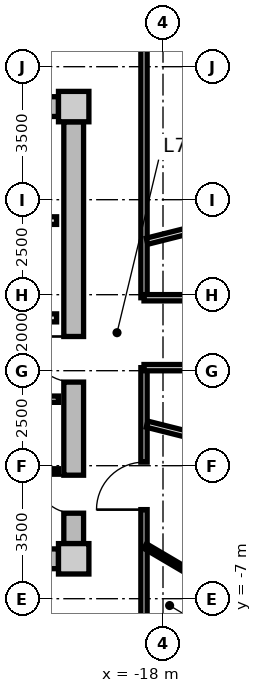
"""IFC4 building model, lengths in metres.
Left out: names, types, materials, properties, quantities, classifications, styles, units other than length and angle.
Written with IfcOpenShell. Run it as: python <this file> out.ifc"""

import sys

from ifc_helpers import new_model, si_unit, direction, frame, frame_2d, origin, origin_2d, place, context, subcontext, project, spatial, rectangle, extrude, source, transform, mapped, element, fill, save


model = new_model("IFC4")
c1 = context("Model", 3, precision=1e-05, world=origin(), true_north=direction((0.0, 1.0)))
c2 = subcontext(c1, "Body", "Model", "MODEL_VIEW")
j1 = project(units=[si_unit("LENGTHUNIT", "METRE"), si_unit("PLANEANGLEUNIT", "RADIAN")], contexts=[c1])
p1 = place(None, origin())
s1 = spatial("IfcSite", under=j1, at=p1, CompositionType="ELEMENT")
p2 = place(p1, origin())
s2 = spatial("IfcBuilding", under=s1, at=p2, CompositionType="ELEMENT")
p3 = place(p2, frame((0.0, 0.0, 229.15)))
s3 = spatial("IfcBuildingStorey", under=s2, at=p3, CompositionType="ELEMENT", Elevation=229.15)
m1 = source(origin(), c2, "Body", "SweptSolid", [
    extrude(rectangle(XDim=0.8, YDim=0.8, at=origin_2d()), origin(), (0.0, 0.0, 1.0), 3.05),
])
for number, where, z_axis, x_axis in (
    (1, (-20.35, -5.95, 0.0), (0.0, 0.0, 1.0), (1.0, 0.0, 0.0)),
    (2, (-20.35, 5.95, 0.0), (0.0, 0.0, 1.0), (1.0, 0.0, 0.0)),
):
    element("IfcColumn", number, at=place(p3, frame(where, z_axis=z_axis, x_axis=x_axis)), inside=s3, PredefinedType="COLUMN", context=c2, shape_type="MappedRepresentation", body=[
        mapped(m1, transform((0.0, 0.0, 0.0), x_axis=(1.0, 0.0, 0.0), y_axis=(0.0, 1.0, 0.0), z_axis=(0.0, 0.0, 1.0), scale=1.0)),
    ])
m2 = source(origin(), c2, "Body", "SweptSolid", [
    extrude(rectangle(XDim=14.5, YDim=0.52, at=frame_2d((7.25, 0.0))), origin(), (0.0, 0.0, 1.0), 2.81),
])
for number, where, z_axis, x_axis in (
    (3, (-35.25, 5.95, 0.0), (0.0, 0.0, 1.0), (1.0, 0.0, 0.0)),
    (4, (-20.75, -5.95, 0.0), (0.0, 0.0, 1.0), (-1.0, 0.0, 0.0)),
):
    element("IfcWall", number, at=place(p3, frame(where, z_axis=z_axis, x_axis=x_axis)), inside=s3, PredefinedType="SHEAR", context=c2, shape_type="MappedRepresentation", body=[
        mapped(m2, transform((0.0, 0.0, 0.0), x_axis=(1.0, 0.0, 0.0), y_axis=(0.0, 1.0, 0.0), z_axis=(0.0, 0.0, 1.0), scale=1.0)),
    ])
m3 = source(origin(), c2, "Body", "SweptSolid", [
    extrude(rectangle(XDim=11.1, YDim=0.52, at=frame_2d((5.55, 0.0))), origin(), (0.0, 0.0, 1.0), 2.81),
])
p4 = place(p3, frame((-20.35, 5.55, 0.0), z_axis=(0.0, 0.0, 1.0), x_axis=(0.0, -1.0, 0.0)))
e5 = element("IfcWall", 5, at=p4, inside=s3, PredefinedType="SHEAR", context=c2, shape_type="MappedRepresentation", body=[
    mapped(m3, transform((0.0, 0.0, 0.0), x_axis=(1.0, 0.0, 0.0), y_axis=(0.0, 1.0, 0.0), z_axis=(0.0, 0.0, 1.0), scale=1.0)),
])
p5 = place(p4, frame((5.65, 0.0, 0.0)))
e6 = element("IfcOpeningElement", 6, at=p5, cuts=e5, PredefinedType="OPENING", context=c2, shape_type="SweptSolid", body=[
    extrude(rectangle(XDim=1.2, YDim=2.15, at=frame_2d((0.6, 1.075))), frame((0.0, 0.27, 0.0), z_axis=(0.0, -1.0, 0.0), x_axis=(1.0, 0.0, 0.0)), (0.0, 0.0, 1.0), 0.54),
])
p6 = place(p4, frame((9.3, 0.0, 0.0)))
e7 = element("IfcOpeningElement", 7, at=p6, cuts=e5, PredefinedType="OPENING", context=c2, shape_type="SweptSolid", body=[
    extrude(rectangle(XDim=1.0, YDim=2.1, at=frame_2d((0.5, 1.05))), frame((0.0, 0.27, 0.0), z_axis=(0.0, -1.0, 0.0), x_axis=(1.0, 0.0, 0.0)), (0.0, 0.0, 1.0), 0.54),
])
m4 = source(origin(), c2, "Body", "SweptSolid", [
    extrude(rectangle(XDim=3.2, YDim=0.2, at=frame_2d((1.6, 0.0))), origin(), (0.0, 0.0, 1.0), 2.795),
])
p7 = place(p3, frame((-24.0, 2.95, 0.0), z_axis=(0.0, 0.0, 1.0), x_axis=(1.0, 0.0, 0.0)))
e8 = element("IfcWall", 8, at=p7, inside=s3, PredefinedType="PARTITIONING", context=c2, shape_type="MappedRepresentation", body=[
    mapped(m4, transform((0.0, 0.0, 0.0), x_axis=(1.0, 0.0, 0.0), y_axis=(0.0, 1.0, 0.0), z_axis=(0.0, 0.0, 1.0), scale=1.0)),
])
m5 = source(origin(), c2, "Body", "SweptSolid", [
    extrude(rectangle(XDim=6.66, YDim=0.21, at=frame_2d((3.33, 0.0))), origin(), (0.0, 0.0, 1.0), 2.795),
])
p8 = place(p3, frame((-27.46, 0.39, 0.0), z_axis=(0.0, 0.0, 1.0), x_axis=(1.0, 0.0, 0.0)))
e9 = element("IfcWall", 9, at=p8, inside=s3, PredefinedType="PARTITIONING", context=c2, shape_type="MappedRepresentation", body=[
    mapped(m5, transform((0.0, 0.0, 0.0), x_axis=(1.0, 0.0, 0.0), y_axis=(0.0, 1.0, 0.0), z_axis=(0.0, 0.0, 1.0), scale=1.0)),
])
p9 = place(p8, frame((1.0, 0.0, 0.0)))
e10 = element("IfcOpeningElement", 10, at=p9, cuts=e9, PredefinedType="OPENING", context=c2, shape_type="SweptSolid", body=[
    extrude(rectangle(XDim=1.2, YDim=2.15, at=frame_2d((0.6, 1.075))), frame((0.0, 0.115, 0.0), z_axis=(0.0, -1.0, 0.0), x_axis=(1.0, 0.0, 0.0)), (0.0, 0.0, 1.0), 0.23),
])
m6 = source(origin(), c2, "Body", "SweptSolid", [
    extrude(rectangle(XDim=2.7, YDim=0.165, at=frame_2d((1.35, 0.0))), origin(), (0.0, 0.0, 1.0), 2.795),
])
p10 = place(p3, frame((-23.45, -1.75, 0.0), z_axis=(0.0, 0.0, 1.0), x_axis=(1.0, 0.0, 0.0)))
e11 = element("IfcWall", 11, at=p10, inside=s3, PredefinedType="PARTITIONING", context=c2, shape_type="MappedRepresentation", body=[
    mapped(m6, transform((0.0, 0.0, 0.0), x_axis=(1.0, 0.0, 0.0), y_axis=(0.0, 1.0, 0.0), z_axis=(0.0, 0.0, 1.0), scale=1.0)),
])
p11 = place(p10, frame((0.85, 0.0, 0.0)))
e12 = element("IfcOpeningElement", 12, at=p11, cuts=e11, PredefinedType="OPENING", context=c2, shape_type="SweptSolid", body=[
    extrude(rectangle(XDim=0.925, YDim=2.1, at=frame_2d((0.462, 1.05))), frame((0.0, 0.093, 0.0), z_axis=(0.0, -1.0, 0.0), x_axis=(1.0, 0.0, 0.0)), (0.0, 0.0, 1.0), 0.185),
])
m7 = source(origin(), c2, "Body", "SweptSolid", [
    extrude(rectangle(XDim=2.7, YDim=0.14, at=frame_2d((1.35, 0.0))), origin(), (0.0, 0.0, 1.0), 2.795),
])
p12 = place(p3, frame((-23.45, -3.65, 0.0), z_axis=(0.0, 0.0, 1.0), x_axis=(1.0, 0.0, 0.0)))
e13 = element("IfcWall", 13, at=p12, inside=s3, PredefinedType="PARTITIONING", context=c2, shape_type="MappedRepresentation", body=[
    mapped(m7, transform((0.0, 0.0, 0.0), x_axis=(1.0, 0.0, 0.0), y_axis=(0.0, 1.0, 0.0), z_axis=(0.0, 0.0, 1.0), scale=1.0)),
])
m8 = source(origin(), c2, "Body", "SweptSolid", [
    extrude(rectangle(XDim=6.88, YDim=0.165, at=frame_2d((3.44, 0.0))), origin(), (0.0, 0.0, 1.0), 2.795),
])
p13 = place(p3, frame((-18.5, 7.8, 0.0), z_axis=(0.0, 0.0, 1.0), x_axis=(0.0, -1.0, 0.0)))
e14 = element("IfcWall", 14, at=p13, inside=s3, PredefinedType="PARTITIONING", context=c2, shape_type="MappedRepresentation", body=[
    mapped(m8, transform((0.0, 0.0, 0.0), x_axis=(1.0, 0.0, 0.0), y_axis=(0.0, 1.0, 0.0), z_axis=(0.0, 0.0, 1.0), scale=1.0)),
])
p14 = place(p3, frame((-18.5, -0.92, 0.0), z_axis=(0.0, 0.0, 1.0), x_axis=(0.0, -1.0, 0.0)))
e15 = element("IfcWall", 15, at=p14, inside=s3, PredefinedType="PARTITIONING", context=c2, shape_type="MappedRepresentation", body=[
    mapped(m8, transform((0.0, 0.0, 0.0), x_axis=(1.0, 0.0, 0.0), y_axis=(0.0, 1.0, 0.0), z_axis=(0.0, 0.0, 1.0), scale=1.0)),
])
p15 = place(p14, frame((2.486, 0.0, 0.0)))
e16 = element("IfcOpeningElement", 16, at=p15, cuts=e15, PredefinedType="OPENING", context=c2, shape_type="SweptSolid", body=[
    extrude(rectangle(XDim=1.25, YDim=2.2, at=frame_2d((0.625, 1.1))), frame((0.0, 0.093, 0.0), z_axis=(0.0, -1.0, 0.0), x_axis=(1.0, 0.0, 0.0)), (0.0, 0.0, 1.0), 0.185),
])
m9 = source(origin(), c2, "Body", "SweptSolid", [
    extrude(rectangle(XDim=6.157, YDim=0.165, at=frame_2d((3.079, 0.0))), origin(), (0.0, 0.0, 1.0), 2.395),
])
for number, where, z_axis, x_axis in (
    (17, (-18.42, -2.407, 0.0), (0.0, 0.0, 1.0), (0.97, -0.244, 0.0)),
    (18, (-18.42, 2.407, 0.0), (0.0, 0.0, 1.0), (0.97, 0.244, 0.0)),
):
    element("IfcWall", number, at=place(p3, frame(where, z_axis=z_axis, x_axis=x_axis)), inside=s3, PredefinedType="PARTITIONING", context=c2, shape_type="MappedRepresentation", body=[
        mapped(m9, transform((0.0, 0.0, 0.0), x_axis=(1.0, 0.0, 0.0), y_axis=(0.0, 1.0, 0.0), z_axis=(0.0, 0.0, 1.0), scale=1.0)),
    ])
m10 = source(origin(), c2, "Body", "SweptSolid", [
    extrude(rectangle(XDim=1.859, YDim=0.14, at=frame_2d((0.93, 0.0))), origin(), (0.0, 0.0, 1.0), 2.795),
])
p16 = place(p3, frame((-18.47, -5.615, 0.0), z_axis=(0.0, 0.0, 1.0), x_axis=(0.861555897139, -0.507662718845, 0.0)))
e19 = element("IfcWall", 19, at=p16, inside=s3, PredefinedType="PARTITIONING", context=c2, shape_type="MappedRepresentation", body=[
    mapped(m10, transform((0.0, 0.0, 0.0), x_axis=(1.0, 0.0, 0.0), y_axis=(0.0, 1.0, 0.0), z_axis=(0.0, 0.0, 1.0), scale=1.0)),
])
m11 = source(origin(), c2, "Body", "SweptSolid", [
    extrude(rectangle(XDim=2.939, YDim=0.14, at=frame_2d((1.47, 0.0))), origin(), (0.0, 0.0, 1.0), 2.795),
])
p17 = place(p3, frame((-16.868, -6.559, 0.0), z_axis=(0.0, 0.0, 1.0), x_axis=(-0.505883614636, -0.862601743821, 0.0)))
e20 = element("IfcWall", 20, at=p17, inside=s3, PredefinedType="PARTITIONING", context=c2, shape_type="MappedRepresentation", body=[
    mapped(m11, transform((0.0, 0.0, 0.0), x_axis=(1.0, 0.0, 0.0), y_axis=(0.0, 1.0, 0.0), z_axis=(0.0, 0.0, 1.0), scale=1.0)),
])
p18 = place(p17, frame((1.01, 0.0, 0.0)))
e21 = element("IfcOpeningElement", 21, at=p18, cuts=e20, PredefinedType="OPENING", context=c2, shape_type="SweptSolid", body=[
    extrude(rectangle(XDim=0.92, YDim=2.1, at=frame_2d((0.46, 1.05))), frame((0.0, 0.08, 0.0), z_axis=(0.0, -1.0, 0.0), x_axis=(1.0, 0.0, 0.0)), (0.0, 0.0, 1.0), 0.16),
])
m12 = source(origin(), c2, "Body", "SweptSolid", [
    extrude(rectangle(XDim=37.0, YDim=0.165, at=frame_2d((18.5, 0.0))), origin(), (0.0, 0.0, 1.0), 2.795),
])
p19 = place(p3, frame((-18.5, -0.92, 0.0), z_axis=(0.0, 0.0, 1.0), x_axis=(1.0, 0.0, 0.0)))
e22 = element("IfcWall", 22, at=p19, inside=s3, PredefinedType="PARTITIONING", context=c2, shape_type="MappedRepresentation", body=[
    mapped(m12, transform((0.0, 0.0, 0.0), x_axis=(1.0, 0.0, 0.0), y_axis=(0.0, 1.0, 0.0), z_axis=(0.0, 0.0, 1.0), scale=1.0)),
])
p20 = place(p19, frame((2.662, 0.0, 0.0)))
e23 = element("IfcOpeningElement", 23, at=p20, cuts=e22, PredefinedType="OPENING", context=c2, shape_type="SweptSolid", body=[
    extrude(rectangle(XDim=0.95, YDim=2.1, at=frame_2d((0.475, 1.05))), frame((0.0, 0.093, 0.0), z_axis=(0.0, -1.0, 0.0), x_axis=(1.0, 0.0, 0.0)), (0.0, 0.0, 1.0), 0.185),
])
p21 = place(p19, frame((33.388, 0.0, 0.0)))
e24 = element("IfcOpeningElement", 24, at=p21, cuts=e22, PredefinedType="OPENING", context=c2, shape_type="SweptSolid", body=[
    extrude(rectangle(XDim=0.95, YDim=2.1, at=frame_2d((0.475, 1.05))), frame((0.0, 0.093, 0.0), z_axis=(0.0, -1.0, 0.0), x_axis=(1.0, 0.0, 0.0)), (0.0, 0.0, 1.0), 0.185),
])
p22 = place(p19, frame((12.71, 0.0, 0.0)))
e25 = element("IfcOpeningElement", 25, at=p22, cuts=e22, PredefinedType="OPENING", context=c2, shape_type="SweptSolid", body=[
    extrude(rectangle(XDim=1.25, YDim=2.2, at=frame_2d((0.625, 1.1))), frame((0.0, 0.093, 0.0), z_axis=(0.0, -1.0, 0.0), x_axis=(1.0, 0.0, 0.0)), (0.0, 0.0, 1.0), 0.185),
])
p23 = place(p19, frame((20.875, 0.0, 0.0)))
e26 = element("IfcOpeningElement", 26, at=p23, cuts=e22, PredefinedType="OPENING", context=c2, shape_type="SweptSolid", body=[
    extrude(rectangle(XDim=1.25, YDim=2.2, at=frame_2d((0.625, 1.1))), frame((0.0, 0.093, 0.0), z_axis=(0.0, -1.0, 0.0), x_axis=(1.0, 0.0, 0.0)), (0.0, 0.0, 1.0), 0.185),
])
p24 = place(p19, frame((26.675, 0.0, 0.0)))
e27 = element("IfcOpeningElement", 27, at=p24, cuts=e22, PredefinedType="OPENING", context=c2, shape_type="SweptSolid", body=[
    extrude(rectangle(XDim=1.25, YDim=2.2, at=frame_2d((0.625, 1.1))), frame((0.0, 0.093, 0.0), z_axis=(0.0, -1.0, 0.0), x_axis=(1.0, 0.0, 0.0)), (0.0, 0.0, 1.0), 0.185),
])
p25 = place(p3, frame((-18.5, 0.92, 0.0), z_axis=(0.0, 0.0, 1.0), x_axis=(1.0, 0.0, 0.0)))
e28 = element("IfcWall", 28, at=p25, inside=s3, PredefinedType="PARTITIONING", context=c2, shape_type="MappedRepresentation", body=[
    mapped(m12, transform((0.0, 0.0, 0.0), x_axis=(1.0, 0.0, 0.0), y_axis=(0.0, 1.0, 0.0), z_axis=(0.0, 0.0, 1.0), scale=1.0)),
])
p26 = place(p25, frame((2.662, 0.0, 0.0)))
e29 = element("IfcOpeningElement", 29, at=p26, cuts=e28, PredefinedType="OPENING", context=c2, shape_type="SweptSolid", body=[
    extrude(rectangle(XDim=0.95, YDim=2.1, at=frame_2d((0.475, 1.05))), frame((0.0, 0.093, 0.0), z_axis=(0.0, -1.0, 0.0), x_axis=(1.0, 0.0, 0.0)), (0.0, 0.0, 1.0), 0.185),
])
p27 = place(p25, frame((33.388, 0.0, 0.0)))
e30 = element("IfcOpeningElement", 30, at=p27, cuts=e28, PredefinedType="OPENING", context=c2, shape_type="SweptSolid", body=[
    extrude(rectangle(XDim=0.95, YDim=2.1, at=frame_2d((0.475, 1.05))), frame((0.0, 0.093, 0.0), z_axis=(0.0, -1.0, 0.0), x_axis=(1.0, 0.0, 0.0)), (0.0, 0.0, 1.0), 0.185),
])
p28 = place(p25, frame((7.64, 0.0, 0.0)))
e31 = element("IfcOpeningElement", 31, at=p28, cuts=e28, PredefinedType="OPENING", context=c2, shape_type="SweptSolid", body=[
    extrude(rectangle(XDim=0.92, YDim=2.1, at=frame_2d((0.46, 1.05))), frame((0.0, 0.093, 0.0), z_axis=(0.0, -1.0, 0.0), x_axis=(1.0, 0.0, 0.0)), (0.0, 0.0, 1.0), 0.185),
])
p29 = place(p25, frame((13.275, 0.0, 0.0)))
e32 = element("IfcOpeningElement", 32, at=p29, cuts=e28, PredefinedType="OPENING", context=c2, shape_type="SweptSolid", body=[
    extrude(rectangle(XDim=1.25, YDim=2.2, at=frame_2d((0.625, 1.1))), frame((0.0, 0.093, 0.0), z_axis=(0.0, -1.0, 0.0), x_axis=(1.0, 0.0, 0.0)), (0.0, 0.0, 1.0), 0.185),
])
p30 = place(p25, frame((20.875, 0.0, 0.0)))
e33 = element("IfcOpeningElement", 33, at=p30, cuts=e28, PredefinedType="OPENING", context=c2, shape_type="SweptSolid", body=[
    extrude(rectangle(XDim=1.25, YDim=2.2, at=frame_2d((0.625, 1.1))), frame((0.0, 0.093, 0.0), z_axis=(0.0, -1.0, 0.0), x_axis=(1.0, 0.0, 0.0)), (0.0, 0.0, 1.0), 0.185),
])
p31 = place(p25, frame((26.675, 0.0, 0.0)))
e34 = element("IfcOpeningElement", 34, at=p31, cuts=e28, PredefinedType="OPENING", context=c2, shape_type="SweptSolid", body=[
    extrude(rectangle(XDim=1.25, YDim=2.2, at=frame_2d((0.625, 1.1))), frame((0.0, 0.093, 0.0), z_axis=(0.0, -1.0, 0.0), x_axis=(1.0, 0.0, 0.0)), (0.0, 0.0, 1.0), 0.185),
])
m13 = source(origin(), c2, "Body", "SweptSolid", [
    extrude(rectangle(XDim=1.2, YDim=2.15, at=frame_2d((0.6, 1.075))), frame((0.0, 0.025, 0.0), z_axis=(0.0, -1.0, 0.0), x_axis=(1.0, 0.0, 0.0)), (0.0, 0.0, 1.0), 0.05),
])
p32 = place(p5, frame((1.2, 0.0, 0.0), z_axis=(0.0, 0.0, 1.0), x_axis=(-1.0, 0.0, 0.0)))
e35 = element("IfcDoor", 35, at=p32, inside=s3, OperationType="SINGLE_SWING_RIGHT", PredefinedType="DOOR", context=c2, shape_type="MappedRepresentation", body=[
    mapped(m13, transform((0.0, 0.0, 0.0), x_axis=(1.0, 0.0, 0.0), y_axis=(0.0, 1.0, 0.0), z_axis=(0.0, 0.0, 1.0), scale=1.0)),
])
fill(e6, e35)
m14 = source(origin(), c2, "Body", "SweptSolid", [
    extrude(rectangle(XDim=1.0, YDim=2.1, at=frame_2d((0.5, 1.05))), frame((0.0, 0.025, 0.0), z_axis=(0.0, -1.0, 0.0), x_axis=(1.0, 0.0, 0.0)), (0.0, 0.0, 1.0), 0.05),
])
p33 = place(p6, frame((1.0, 0.0, 0.0), z_axis=(0.0, 0.0, 1.0), x_axis=(-1.0, 0.0, 0.0)))
e36 = element("IfcDoor", 36, at=p33, inside=s3, OperationType="SINGLE_SWING_RIGHT", PredefinedType="DOOR", context=c2, shape_type="MappedRepresentation", body=[
    mapped(m14, transform((0.0, 0.0, 0.0), x_axis=(1.0, 0.0, 0.0), y_axis=(0.0, 1.0, 0.0), z_axis=(0.0, 0.0, 1.0), scale=1.0)),
])
fill(e7, e36)
m15 = source(origin(), c2, "Body", "SweptSolid", [
    extrude(rectangle(XDim=1.25, YDim=2.2, at=frame_2d((0.625, 1.1))), frame((0.0, 0.025, 0.0), z_axis=(0.0, -1.0, 0.0), x_axis=(1.0, 0.0, 0.0)), (0.0, 0.0, 1.0), 0.05),
])
p34 = place(p15, frame((1.25, 0.0, 0.0), z_axis=(0.0, 0.0, 1.0), x_axis=(-1.0, 0.0, 0.0)))
e37 = element("IfcDoor", 37, at=p34, inside=s3, OperationType="SINGLE_SWING_LEFT", PredefinedType="DOOR", context=c2, shape_type="MappedRepresentation", body=[
    mapped(m15, transform((0.0, 0.0, 0.0), x_axis=(1.0, 0.0, 0.0), y_axis=(0.0, 1.0, 0.0), z_axis=(0.0, 0.0, 1.0), scale=1.0)),
])
fill(e16, e37)
save(model, sys.argv[1])
